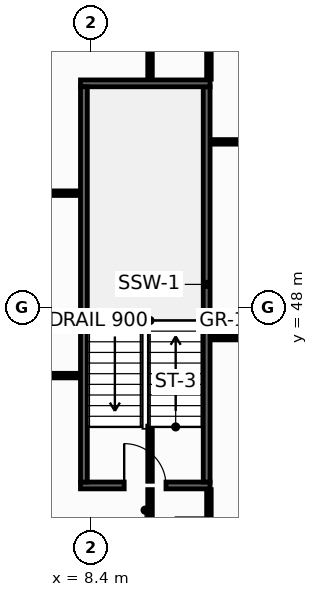
"""IFC4 building model, lengths in metres.
Left out: names, types, materials, properties, quantities, classifications, styles, units other than length and angle.
Written with IfcOpenShell. Run it as: python <this file> out.ifc"""

import sys

from ifc_helpers import new_model, si_unit, direction, frame, frame_2d, origin, place, context, subcontext, project, spatial, rectangle, extrude, element, fill, save


model = new_model("IFC4")
c1 = context("Model", 3, precision=1e-05, world=origin(), true_north=direction((0.0, 1.0)))
c2 = subcontext(c1, "Body", "Model", "MODEL_VIEW")
j1 = project(units=[si_unit("LENGTHUNIT", "METRE"), si_unit("PLANEANGLEUNIT", "RADIAN")], contexts=[c1])
p1 = place(None, origin())
s1 = spatial("IfcSite", under=j1, at=p1, CompositionType="ELEMENT")
p2 = place(p1, origin())
s2 = spatial("IfcBuilding", under=s1, at=p2, CompositionType="ELEMENT")
p3 = place(p2, frame((0.0, 0.0, 217.0)))
s3 = spatial("IfcBuildingStorey", under=s2, at=p3, CompositionType="ELEMENT", Elevation=217.0)
p4 = place(p3, frame((8.12, 43.31, 0.0), z_axis=(0.0, 0.0, 1.0), x_axis=(1.0, 0.0, 0.0)))
e1 = element("IfcWall", 1, at=p4, inside=s3, PredefinedType="SHEAR", context=c2, shape_type="SweptSolid", body=[
    extrude(rectangle(XDim=3.41, YDim=0.18, at=frame_2d((1.705, 0.0))), origin(), (0.0, 0.0, 1.0), 3.55),
])
p5 = place(p4, frame((1.15, 0.0, 0.0)))
e2 = element("IfcOpeningElement", 2, at=p5, cuts=e1, PredefinedType="OPENING", context=c2, shape_type="SweptSolid", body=[
    extrude(rectangle(XDim=1.1, YDim=2.15, at=frame_2d((0.55, 1.075))), frame((0.0, 0.1, 0.0), z_axis=(0.0, -1.0, 0.0), x_axis=(1.0, 0.0, 0.0)), (0.0, 0.0, 1.0), 0.2),
])
p6 = place(p3, frame((11.44, 43.4, 0.0), z_axis=(0.0, 0.0, 1.0), x_axis=(0.0, 1.0, 0.0)))
e3 = element("IfcWall", 3, at=p6, inside=s3, PredefinedType="SHEAR", context=c2, shape_type="SweptSolid", body=[
    extrude(rectangle(XDim=10.4, YDim=0.18, at=frame_2d((5.2, 0.0))), origin(), (0.0, 0.0, 1.0), 3.55),
])
p7 = place(p3, frame((11.53, 53.89, 0.0), z_axis=(0.0, 0.0, 1.0), x_axis=(-1.0, 0.0, 0.0)))
e4 = element("IfcWall", 4, at=p7, inside=s3, PredefinedType="SHEAR", context=c2, shape_type="SweptSolid", body=[
    extrude(rectangle(XDim=3.41, YDim=0.18, at=frame_2d((1.705, 0.0))), origin(), (0.0, 0.0, 1.0), 3.55),
])
p8 = place(p3, frame((8.21, 53.8, 0.0), z_axis=(0.0, 0.0, 1.0), x_axis=(0.0, -1.0, 0.0)))
e5 = element("IfcWall", 5, at=p8, inside=s3, PredefinedType="SHEAR", context=c2, shape_type="SweptSolid", body=[
    extrude(rectangle(XDim=10.4, YDim=0.18, at=frame_2d((5.2, 0.0))), origin(), (0.0, 0.0, 1.0), 3.55),
])
p9 = place(p3, frame((11.55, 52.35, 0.0), z_axis=(0.0, 0.0, 1.0), x_axis=(1.0, 0.0, 0.0)))
e6 = element("IfcWall", 6, at=p9, inside=s3, PredefinedType="PARTITIONING", context=c2, shape_type="SweptSolid", body=[
    extrude(rectangle(XDim=2.03, YDim=0.12, at=frame_2d((1.015, 0.0))), origin(), (0.0, 0.0, 1.0), 3.55),
])
p10 = place(p3, frame((11.5, 54.0, 0.0), z_axis=(0.0, 0.0, 1.0), x_axis=(0.0, 1.0, 0.0)))
e7 = element("IfcWall", 7, at=p10, inside=s3, PredefinedType="PARTITIONING", context=c2, shape_type="SweptSolid", body=[
    extrude(rectangle(XDim=1.995, YDim=0.12, at=frame_2d((0.998, 0.0))), origin(), (0.0, 0.0, 1.0), 2.935),
])
p11 = place(p3, frame((5.122, 46.2, 0.0), z_axis=(0.0, 0.0, 1.0), x_axis=(1.0, 0.0, 0.0)))
e8 = element("IfcWall", 8, at=p11, inside=s3, PredefinedType="PARTITIONING", context=c2, shape_type="SweptSolid", body=[
    extrude(rectangle(XDim=2.978, YDim=0.12, at=frame_2d((1.489, 0.0))), origin(), (0.0, 0.0, 1.0), 2.835),
])
p12 = place(p3, frame((4.31, 51.0, 0.0), z_axis=(0.0, 0.0, 1.0), x_axis=(1.0, 0.0, 0.0)))
e9 = element("IfcWall", 9, at=p12, inside=s3, PredefinedType="PARTITIONING", context=c2, shape_type="SweptSolid", body=[
    extrude(rectangle(XDim=3.79, YDim=0.12, at=frame_2d((1.895, 0.0))), origin(), (0.0, 0.0, 1.0), 2.835),
])
p13 = place(p3, frame((9.95, 40.83, 0.0), z_axis=(0.0, 0.0, 1.0), x_axis=(0.0, 1.0, 0.0)))
e10 = element("IfcWall", 10, at=p13, inside=s3, PredefinedType="PARTITIONING", context=c2, shape_type="SweptSolid", body=[
    extrude(rectangle(XDim=2.37, YDim=0.12, at=frame_2d((1.185, 0.0))), origin(), (0.0, 0.0, 1.0), 2.835),
])
p14 = place(p13, frame((0.735, 0.0, 0.0)))
e11 = element("IfcOpeningElement", 11, at=p14, cuts=e10, PredefinedType="OPENING", context=c2, shape_type="SweptSolid", body=[
    extrude(rectangle(XDim=0.9, YDim=2.1, at=frame_2d((0.45, 1.05))), frame((0.0, 0.07, 0.0), z_axis=(0.0, -1.0, 0.0), x_axis=(1.0, 0.0, 0.0)), (0.0, 0.0, 1.0), 0.14),
])
p15 = place(p3, frame((9.95, 43.42, 0.0), z_axis=(0.0, 0.0, 1.0), x_axis=(0.0, 1.0, 0.0)))
e12 = element("IfcWall", 12, at=p15, inside=s3, PredefinedType="PARTITIONING", context=c2, shape_type="SweptSolid", body=[
    extrude(rectangle(XDim=1.45, YDim=0.12, at=frame_2d((0.725, 0.0))), origin(), (0.0, 0.0, 1.0), 3.55),
])
p16 = place(p3, frame((9.95, 54.0, 0.0), z_axis=(0.0, 0.0, 1.0), x_axis=(0.0, 1.0, 0.0)))
e13 = element("IfcWall", 13, at=p16, inside=s3, PredefinedType="PARTITIONING", context=c2, shape_type="SweptSolid", body=[
    extrude(rectangle(XDim=1.995, YDim=0.12, at=frame_2d((0.998, 0.0))), origin(), (0.0, 0.0, 1.0), 2.935),
])
p17 = place(p3, frame((11.55, 47.2, 0.0), z_axis=(0.0, 0.0, 1.0), x_axis=(1.0, 0.0, 0.0)))
e14 = element("IfcWall", 14, at=p17, inside=s3, PredefinedType="PARTITIONING", context=c2, shape_type="SweptSolid", body=[
    extrude(rectangle(XDim=2.03, YDim=0.12, at=frame_2d((1.015, 0.0))), origin(), (0.0, 0.0, 1.0), 3.55),
])
p18 = place(p3, frame((11.5, 40.83, 0.0), z_axis=(0.0, 0.0, 1.0), x_axis=(0.0, 1.0, 0.0)))
e15 = element("IfcWall", 15, at=p18, inside=s3, PredefinedType="PARTITIONING", context=c2, shape_type="SweptSolid", body=[
    extrude(rectangle(XDim=2.37, YDim=0.12, at=frame_2d((1.185, 0.0))), origin(), (0.0, 0.0, 1.0), 2.835),
])
p19 = place(p18, frame((0.735, 0.0, 0.0)))
e16 = element("IfcOpeningElement", 16, at=p19, cuts=e15, PredefinedType="OPENING", context=c2, shape_type="SweptSolid", body=[
    extrude(rectangle(XDim=0.9, YDim=2.1, at=frame_2d((0.45, 1.05))), frame((0.0, 0.07, 0.0), z_axis=(0.0, -1.0, 0.0), x_axis=(1.0, 0.0, 0.0)), (0.0, 0.0, 1.0), 0.14),
])
p20 = place(p5, origin())
e17 = element("IfcDoor", 17, at=p20, inside=s3, OperationType="SINGLE_SWING_LEFT", PredefinedType="DOOR", context=c2, shape_type="SweptSolid", body=[
    extrude(rectangle(XDim=1.1, YDim=2.15, at=frame_2d((0.55, 1.075))), frame((0.0, 0.025, 0.0), z_axis=(0.0, -1.0, 0.0), x_axis=(1.0, 0.0, 0.0)), (0.0, 0.0, 1.0), 0.05),
])
fill(e2, e17)
save(model, sys.argv[1])
